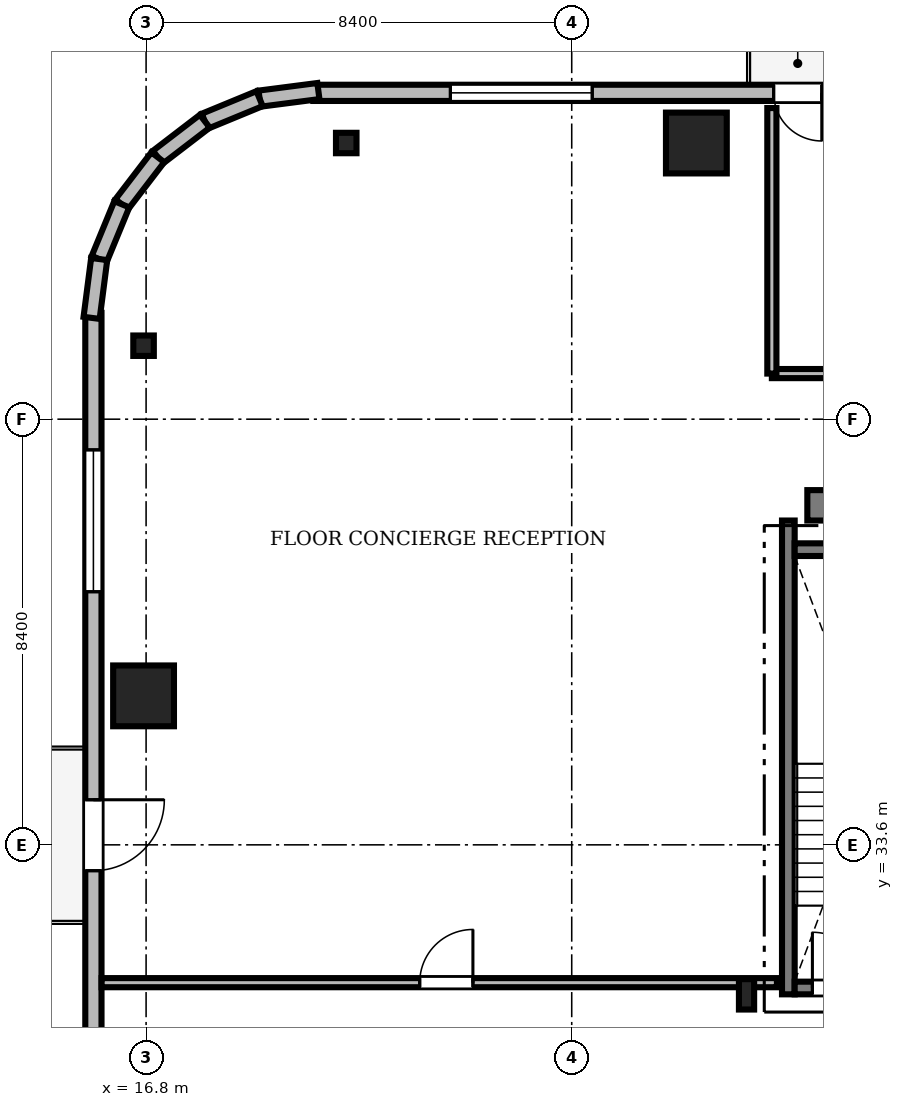
"""IFC4 building model, lengths in metres.
Left out: names, types, materials, properties, quantities, classifications, styles, units other than length and angle.
Written with IfcOpenShell. Run it as: python <this file> out.ifc"""

import sys

from ifc_helpers import new_model, si_unit, direction, frame, frame_2d, origin, origin_2d, place, context, subcontext, project, spatial, rectangle, i_section, extrude, source, transform, mapped, element, fill, save


model = new_model("IFC4")
c1 = context("Model", 3, precision=1e-05, world=origin(), true_north=direction((0.0, 1.0)))
c2 = subcontext(c1, "Body", "Model", "MODEL_VIEW")
j1 = project(units=[si_unit("LENGTHUNIT", "METRE"), si_unit("PLANEANGLEUNIT", "RADIAN")], contexts=[c1])
p1 = place(None, origin())
s1 = spatial("IfcSite", under=j1, at=p1, CompositionType="ELEMENT")
p2 = place(p1, origin())
s2 = spatial("IfcBuilding", under=s1, at=p2, CompositionType="ELEMENT")
p3 = place(p2, frame((0.0, 0.0, 242.7)))
s3 = spatial("IfcBuildingStorey", under=s2, at=p3, CompositionType="ELEMENT", Elevation=242.7)
m1 = source(origin(), c2, "Body", "SweptSolid", [
    extrude(rectangle(XDim=17.52, YDim=0.6, at=frame_2d((8.76, 0.0))), origin(), (0.0, 0.0, 1.0), 3.73),
])
p4 = place(p3, frame((29.85, 40.3, 0.0), z_axis=(0.0, 0.0, 1.0), x_axis=(1.0, 0.0, 0.0)))
e1 = element("IfcWall", 1, at=p4, inside=s3, PredefinedType="SHEAR", context=c2, shape_type="MappedRepresentation", body=[
    mapped(m1, transform((0.0, 0.0, 0.0), scale=1.0)),
])
m2 = source(origin(), c2, "Body", "SweptSolid", [
    extrude(i_section(OverallWidth=0.3, OverallDepth=0.6, WebThickness=0.015, FlangeThickness=0.03, FilletRadius=0.027, at=origin_2d()), origin(), (0.0, 0.0, 1.0), 3.73),
])
p5 = place(p3, frame((28.65, 30.65, 0.0), z_axis=(0.0, 0.0, 1.0), x_axis=(1.0, 0.0, 0.0)))
e2 = element("IfcColumn", 2, at=p5, inside=s3, PredefinedType="COLUMN", context=c2, shape_type="MappedRepresentation", body=[
    mapped(m2, transform((0.0, 0.0, 0.0), scale=1.0)),
])
m3 = source(origin(), c2, "Body", "SweptSolid", [
    extrude(rectangle(XDim=1.2, YDim=1.2, at=origin_2d()), origin(), (0.0, 0.0, 1.0), 3.73),
])
for number, where, z_axis, x_axis in (
    (3, (27.66, 47.45, 0.0), (0.0, 0.0, 1.0), (1.0, 0.0, 0.0)),
    (4, (16.75, 36.54, 0.0), (0.0, 0.0, 1.0), (1.0, 0.0, 0.0)),
):
    element("IfcColumn", number, at=place(p3, frame(where, z_axis=z_axis, x_axis=x_axis)), inside=s3, PredefinedType="COLUMN", context=c2, shape_type="MappedRepresentation", body=[
        mapped(m3, transform((0.0, 0.0, 0.0), scale=1.0)),
    ])
m4 = source(origin(), c2, "Body", "SweptSolid", [
    extrude(i_section(OverallWidth=0.405, OverallDepth=0.403, WebThickness=0.018, FlangeThickness=0.028, FilletRadius=0.015, at=origin_2d()), origin(), (0.0, 0.0, 1.0), 3.73),
])
for number, where, z_axis, x_axis in (
    (5, (20.75, 47.45, 0.0), (0.0, 0.0, 1.0), (1.0, 0.0, 0.0)),
    (6, (16.75, 43.45, 0.0), (0.0, 0.0, 1.0), (1.0, 0.0, 0.0)),
):
    element("IfcColumn", number, at=place(p3, frame(where, z_axis=z_axis, x_axis=x_axis)), inside=s3, PredefinedType="COLUMN", context=c2, shape_type="MappedRepresentation", body=[
        mapped(m4, transform((0.0, 0.0, 0.0), scale=1.0)),
    ])
m5 = source(origin(), c2, "Body", "SweptSolid", [
    extrude(rectangle(XDim=15.6, YDim=0.32, at=frame_2d((7.8, 0.0))), origin(), (0.0, 0.0, 1.0), 3.73),
])
p6 = place(p3, frame((35.7, 48.44, 0.0), z_axis=(0.0, 0.0, 1.0), x_axis=(-1.0, 0.0, 0.0)))
e7 = element("IfcWall", 7, at=p6, inside=s3, PredefinedType="SOLIDWALL", context=c2, shape_type="MappedRepresentation", body=[
    mapped(m5, transform((0.0, 0.0, 0.0), scale=1.0)),
])
m6 = source(origin(), c2, "Body", "SweptSolid", [
    extrude(rectangle(XDim=0.95, YDim=2.3, at=frame_2d((0.475, 1.15))), frame((0.0, 0.17, 0.0), z_axis=(0.0, -1.0, 0.0), x_axis=(1.0, 0.0, 0.0)), (0.0, 0.0, 1.0), 0.34),
])
p7 = place(p6, frame((5.565, 0.0, 0.0)))
e8 = element("IfcOpeningElement", 8, at=p7, cuts=e7, PredefinedType="OPENING", context=c2, shape_type="MappedRepresentation", body=[
    mapped(m6, transform((0.0, 0.0, 0.0), scale=1.0)),
])
m7 = source(origin(), c2, "Body", "SweptSolid", [
    extrude(rectangle(XDim=2.8, YDim=2.4, at=frame_2d((1.4, 1.2))), frame((0.0, 0.17, 0.0), z_axis=(0.0, -1.0, 0.0), x_axis=(1.0, 0.0, 0.0)), (0.0, 0.0, 1.0), 0.34),
])
p8 = place(p6, frame((10.095, 0.0, 0.72)))
e9 = element("IfcOpeningElement", 9, at=p8, cuts=e7, PredefinedType="OPENING", context=c2, shape_type="MappedRepresentation", body=[
    mapped(m7, transform((0.0, 0.0, 0.0), scale=1.0)),
])
m8 = source(origin(), c2, "Body", "SweptSolid", [
    extrude(rectangle(XDim=15.6, YDim=0.32, at=frame_2d((7.8, 0.0))), origin(), (0.0, 0.0, 1.0), 3.73),
])
p9 = place(p3, frame((15.76, 44.1, 0.0), z_axis=(0.0, 0.0, 1.0), x_axis=(0.0, -1.0, 0.0)))
e10 = element("IfcWall", 10, at=p9, inside=s3, PredefinedType="SOLIDWALL", context=c2, shape_type="MappedRepresentation", body=[
    mapped(m8, transform((0.0, 0.0, 0.0), scale=1.0)),
])
m9 = source(origin(), c2, "Body", "SweptSolid", [
    extrude(rectangle(XDim=1.4, YDim=2.3, at=frame_2d((0.7, 1.15))), frame((0.0, 0.17, 0.0), z_axis=(0.0, -1.0, 0.0), x_axis=(1.0, 0.0, 0.0)), (0.0, 0.0, 1.0), 0.34),
])
p10 = place(p9, frame((9.61, 0.0, 0.0)))
e11 = element("IfcOpeningElement", 11, at=p10, cuts=e10, PredefinedType="OPENING", context=c2, shape_type="MappedRepresentation", body=[
    mapped(m9, transform((0.0, 0.0, 0.0), scale=1.0)),
])
p11 = place(p9, frame((2.705, 0.0, 0.72)))
e12 = element("IfcOpeningElement", 12, at=p11, cuts=e10, PredefinedType="OPENING", context=c2, shape_type="MappedRepresentation", body=[
    mapped(m7, transform((0.0, 0.0, 0.0), scale=1.0)),
])
m10 = source(origin(), c2, "Body", "SweptSolid", [
    extrude(rectangle(XDim=1.17, YDim=0.32, at=frame_2d((0.585, 0.0))), origin(), (0.0, 0.0, 1.0), 3.73),
])
p12 = place(p3, frame((20.2, 48.476, 0.0), z_axis=(0.0, 0.0, 1.0), x_axis=(-0.991735963317, -0.128295670475, 0.0)))
e13 = element("IfcWall", 13, at=p12, inside=s3, PredefinedType="SOLIDWALL", context=c2, shape_type="MappedRepresentation", body=[
    mapped(m10, transform((0.0, 0.0, 0.0), scale=1.0)),
])
m11 = source(origin(), c2, "Body", "SweptSolid", [
    extrude(rectangle(XDim=1.169, YDim=0.32, at=frame_2d((0.584, 0.0))), origin(), (0.0, 0.0, 1.0), 3.73),
])
p13 = place(p3, frame((19.04, 48.325, 0.0), z_axis=(0.0, 0.0, 1.0), x_axis=(-0.924552646638, -0.381054331552, 0.0)))
e14 = element("IfcWall", 14, at=p13, inside=s3, PredefinedType="SOLIDWALL", context=c2, shape_type="MappedRepresentation", body=[
    mapped(m11, transform((0.0, 0.0, 0.0), scale=1.0)),
])
m12 = source(origin(), c2, "Body", "SweptSolid", [
    extrude(rectangle(XDim=1.169, YDim=0.32, at=frame_2d((0.584, 0.0))), origin(), (0.0, 0.0, 1.0), 3.73),
])
p14 = place(p3, frame((17.959, 47.88, 0.0), z_axis=(0.0, 0.0, 1.0), x_axis=(-0.793663520347, -0.608356981114, 0.0)))
e15 = element("IfcWall", 15, at=p14, inside=s3, PredefinedType="SOLIDWALL", context=c2, shape_type="MappedRepresentation", body=[
    mapped(m12, transform((0.0, 0.0, 0.0), scale=1.0)),
])
m13 = source(origin(), c2, "Body", "SweptSolid", [
    extrude(rectangle(XDim=1.169, YDim=0.32, at=frame_2d((0.584, 0.0))), origin(), (0.0, 0.0, 1.0), 3.73),
])
p15 = place(p3, frame((17.031, 47.169, 0.0), z_axis=(0.0, 0.0, 1.0), x_axis=(-0.608387696831, -0.793639975269, 0.0)))
e16 = element("IfcWall", 16, at=p15, inside=s3, PredefinedType="SOLIDWALL", context=c2, shape_type="MappedRepresentation", body=[
    mapped(m13, transform((0.0, 0.0, 0.0), scale=1.0)),
])
p16 = place(p3, frame((16.32, 46.241, 0.0), z_axis=(0.0, 0.0, 1.0), x_axis=(-0.381054331552, -0.924552646638, 0.0)))
e17 = element("IfcWall", 17, at=p16, inside=s3, PredefinedType="SOLIDWALL", context=c2, shape_type="MappedRepresentation", body=[
    mapped(m11, transform((0.0, 0.0, 0.0), scale=1.0)),
])
p17 = place(p3, frame((15.875, 45.16, 0.0), z_axis=(0.0, 0.0, 1.0), x_axis=(-0.128295670475, -0.991735963317, 0.0)))
e18 = element("IfcWall", 18, at=p17, inside=s3, PredefinedType="SOLIDWALL", context=c2, shape_type="MappedRepresentation", body=[
    mapped(m10, transform((0.0, 0.0, 0.0), scale=1.0)),
])
m14 = source(origin(), c2, "Body", "SweptSolid", [
    extrude(rectangle(XDim=9.35, YDim=0.25, at=frame_2d((4.675, 0.0))), origin(), (0.0, 0.0, 1.0), 3.75),
])
p18 = place(p3, frame((29.475, 30.65, 0.0), z_axis=(0.0, 0.0, 1.0), x_axis=(0.0, 1.0, 0.0)))
e19 = element("IfcWall", 19, at=p18, inside=s3, PredefinedType="SOLIDWALL", context=c2, shape_type="MappedRepresentation", body=[
    mapped(m14, transform((0.0, 0.0, 0.0), scale=1.0)),
])
m15 = source(origin(), c2, "Body", "SweptSolid", [
    extrude(rectangle(XDim=3.15, YDim=0.25, at=frame_2d((1.575, 0.0))), origin(), (0.0, 0.0, 1.0), 3.75),
])
p19 = place(p3, frame((29.6, 39.425, 0.0), z_axis=(0.0, 0.0, 1.0), x_axis=(1.0, 0.0, 0.0)))
e20 = element("IfcWall", 20, at=p19, inside=s3, PredefinedType="SOLIDWALL", context=c2, shape_type="MappedRepresentation", body=[
    mapped(m15, transform((0.0, 0.0, 0.0), scale=1.0)),
])
p20 = place(p3, frame((29.6, 30.775, 0.0), z_axis=(0.0, 0.0, 1.0), x_axis=(1.0, 0.0, 0.0)))
e21 = element("IfcWall", 21, at=p20, inside=s3, PredefinedType="SOLIDWALL", context=c2, shape_type="MappedRepresentation", body=[
    mapped(m15, transform((0.0, 0.0, 0.0), scale=1.0)),
])
m16 = source(origin(), c2, "Body", "SweptSolid", [
    extrude(rectangle(XDim=1.1, YDim=2.2, at=frame_2d((0.55, 1.1))), frame((0.0, 0.135, 0.0), z_axis=(0.0, -1.0, 0.0), x_axis=(1.0, 0.0, 0.0)), (0.0, 0.0, 1.0), 0.27),
])
p21 = place(p20, frame((0.35, 0.0, 0.0)))
e22 = element("IfcOpeningElement", 22, at=p21, cuts=e21, PredefinedType="OPENING", context=c2, shape_type="MappedRepresentation", body=[
    mapped(m16, transform((0.0, 0.0, 0.0), scale=1.0)),
])
m17 = source(origin(), c2, "Body", "SweptSolid", [
    extrude(rectangle(XDim=32.928, YDim=0.18, at=frame_2d((16.464, 0.0))), origin(), (0.0, 0.0, 1.0), 2.972),
])
p22 = place(p3, frame((29.15, 42.9, 0.0), z_axis=(0.0, 0.0, 1.0), x_axis=(1.0, 0.0, 0.0)))
e23 = element("IfcWall", 23, at=p22, inside=s3, PredefinedType="PARTITIONING", context=c2, shape_type="MappedRepresentation", body=[
    mapped(m17, transform((0.0, 0.0, 0.0), scale=1.0)),
])
m18 = source(origin(), c2, "Body", "SweptSolid", [
    extrude(rectangle(XDim=1.05, YDim=2.2, at=frame_2d((0.525, 1.1))), frame((0.0, 0.1, 0.0), z_axis=(0.0, -1.0, 0.0), x_axis=(1.0, 0.0, 0.0)), (0.0, 0.0, 1.0), 0.2),
])
p23 = place(p22, frame((4.5, 0.0, 0.0)))
e24 = element("IfcOpeningElement", 24, at=p23, cuts=e23, PredefinedType="OPENING", context=c2, shape_type="MappedRepresentation", body=[
    mapped(m18, transform((0.0, 0.0, 0.0), scale=1.0)),
])
m19 = source(origin(), c2, "Body", "SweptSolid", [
    extrude(rectangle(XDim=13.328, YDim=0.18, at=frame_2d((6.664, 0.0))), origin(), (0.0, 0.0, 1.0), 2.972),
])
p24 = place(p3, frame((15.922, 30.88, 0.0), z_axis=(0.0, 0.0, 1.0), x_axis=(1.0, 0.0, 0.0)))
e25 = element("IfcWall", 25, at=p24, inside=s3, PredefinedType="PARTITIONING", context=c2, shape_type="MappedRepresentation", body=[
    mapped(m19, transform((0.0, 0.0, 0.0), scale=1.0)),
])
p25 = place(p24, frame((6.278, 0.0, 0.0)))
e26 = element("IfcOpeningElement", 26, at=p25, cuts=e25, PredefinedType="OPENING", context=c2, shape_type="MappedRepresentation", body=[
    mapped(m18, transform((0.0, 0.0, 0.0), scale=1.0)),
])
m20 = source(origin(), c2, "Body", "SweptSolid", [
    extrude(rectangle(XDim=5.24, YDim=0.18, at=frame_2d((2.62, 0.0))), origin(), (0.0, 0.0, 1.0), 2.972),
])
p26 = place(p3, frame((29.15, 42.9, 0.0), z_axis=(0.0, 0.0, 1.0), x_axis=(0.0, 1.0, 0.0)))
e27 = element("IfcWall", 27, at=p26, inside=s3, PredefinedType="PARTITIONING", context=c2, shape_type="MappedRepresentation", body=[
    mapped(m20, transform((0.0, 0.0, 0.0), scale=1.0)),
])
m21 = source(origin(), c2, "Body", "SweptSolid", [
    extrude(rectangle(XDim=0.95, YDim=2.3, at=frame_2d((0.475, 1.15))), frame((0.0, 0.025, 0.0), z_axis=(0.0, -1.0, 0.0), x_axis=(1.0, 0.0, 0.0)), (0.0, 0.0, 1.0), 0.05),
])
p27 = place(p7, frame((0.95, 0.0, 0.0), z_axis=(0.0, 0.0, 1.0), x_axis=(-1.0, 0.0, 0.0)))
e28 = element("IfcDoor", 28, at=p27, inside=s3, OperationType="NOTDEFINED", PredefinedType="DOOR", context=c2, shape_type="MappedRepresentation", body=[
    mapped(m21, transform((0.0, 0.0, 0.0), scale=1.0)),
])
fill(e8, e28)
m22 = source(origin(), c2, "Body", "SweptSolid", [
    extrude(rectangle(XDim=2.8, YDim=2.4, at=frame_2d((1.4, 1.2))), frame((0.0, 0.03, 0.0), z_axis=(0.0, -1.0, 0.0), x_axis=(1.0, 0.0, 0.0)), (0.0, 0.0, 1.0), 0.06),
])
p28 = place(p8, origin())
e29 = element("IfcWindow", 29, at=p28, inside=s3, PartitioningType="SINGLE_PANEL", PredefinedType="WINDOW", context=c2, shape_type="MappedRepresentation", body=[
    mapped(m22, transform((0.0, 0.0, 0.0), scale=1.0)),
])
fill(e9, e29)
m23 = source(origin(), c2, "Body", "SweptSolid", [
    extrude(rectangle(XDim=1.4, YDim=2.3, at=frame_2d((0.7, 1.15))), frame((0.0, 0.025, 0.0), z_axis=(0.0, -1.0, 0.0), x_axis=(1.0, 0.0, 0.0)), (0.0, 0.0, 1.0), 0.05),
])
p29 = place(p10, frame((1.4, 0.0, 0.0), z_axis=(0.0, 0.0, 1.0), x_axis=(-1.0, 0.0, 0.0)))
e30 = element("IfcDoor", 30, at=p29, inside=s3, OperationType="DOUBLE_DOOR_SLIDING", PredefinedType="DOOR", context=c2, shape_type="MappedRepresentation", body=[
    mapped(m23, transform((0.0, 0.0, 0.0), scale=1.0)),
])
fill(e11, e30)
p30 = place(p11, origin())
e31 = element("IfcWindow", 31, at=p30, inside=s3, PartitioningType="SINGLE_PANEL", PredefinedType="WINDOW", context=c2, shape_type="MappedRepresentation", body=[
    mapped(m22, transform((0.0, 0.0, 0.0), scale=1.0)),
])
fill(e12, e31)
m24 = source(origin(), c2, "Body", "SweptSolid", [
    extrude(rectangle(XDim=1.1, YDim=2.2, at=frame_2d((0.55, 1.1))), frame((0.0, 0.025, 0.0), z_axis=(0.0, -1.0, 0.0), x_axis=(1.0, 0.0, 0.0)), (0.0, 0.0, 1.0), 0.05),
])
p31 = place(p21, origin())
e32 = element("IfcDoor", 32, at=p31, inside=s3, OperationType="SINGLE_SWING_LEFT", PredefinedType="DOOR", context=c2, shape_type="MappedRepresentation", body=[
    mapped(m24, transform((0.0, 0.0, 0.0), scale=1.0)),
])
fill(e22, e32)
m25 = source(origin(), c2, "Body", "SweptSolid", [
    extrude(rectangle(XDim=1.05, YDim=2.2, at=frame_2d((0.525, 1.1))), frame((0.0, 0.025, 0.0), z_axis=(0.0, -1.0, 0.0), x_axis=(1.0, 0.0, 0.0)), (0.0, 0.0, 1.0), 0.05),
])
p32 = place(p25, origin())
e33 = element("IfcDoor", 33, at=p32, inside=s3, OperationType="SINGLE_SWING_RIGHT", PredefinedType="DOOR", context=c2, shape_type="MappedRepresentation", body=[
    mapped(m25, transform((0.0, 0.0, 0.0), scale=1.0)),
])
fill(e26, e33)
save(model, sys.argv[1])
